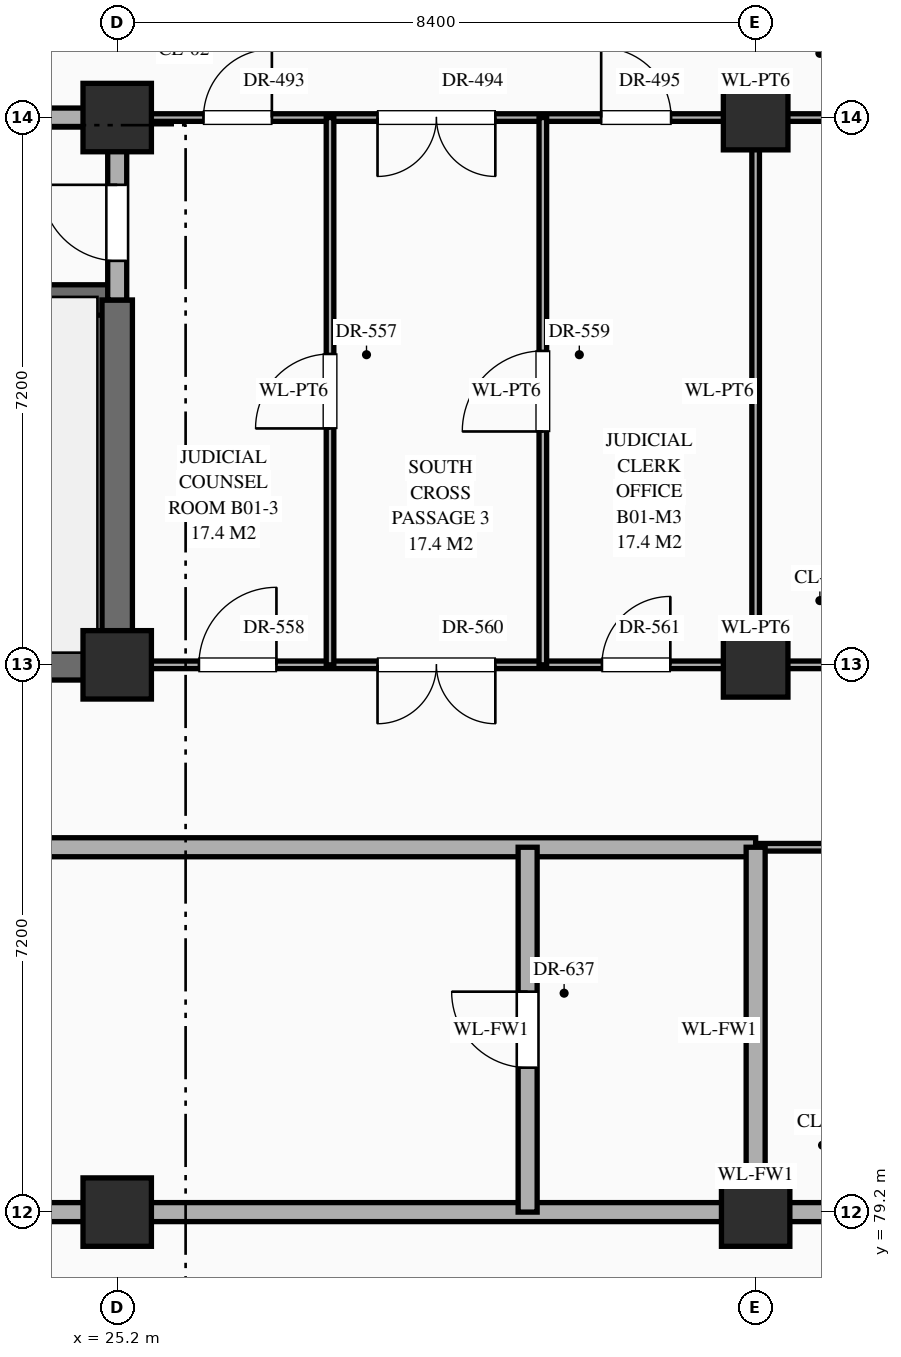
"""IFC4 building model, lengths in metres.
Left out: names, types, materials, properties, quantities, classifications, styles, units other than length and angle.
Written with IfcOpenShell. Run it as: python <this file> out.ifc"""

import sys

from ifc_helpers import new_model, si_unit, direction, frame, frame_2d, origin, origin_2d, place, context, subcontext, project, spatial, rectangle, extrude, element, fill, save


model = new_model("IFC4")
c1 = context("Model", 3, precision=1e-05, world=origin(), true_north=direction((0.0, 1.0)))
c2 = subcontext(c1, "Body", "Model", "MODEL_VIEW")
j1 = project(units=[si_unit("LENGTHUNIT", "METRE"), si_unit("PLANEANGLEUNIT", "RADIAN")], contexts=[c1])
p1 = place(None, origin())
s1 = spatial("IfcSite", under=j1, at=p1, CompositionType="ELEMENT")
p2 = place(p1, origin())
s2 = spatial("IfcBuilding", under=s1, at=p2, CompositionType="ELEMENT")
p3 = place(p2, frame((0.0, 0.0, -5.4)))
s3 = spatial("IfcBuildingStorey", under=s2, at=p3, CompositionType="ELEMENT", Elevation=-5.4)
for number, where, z_axis, x_axis in (
    (1, (25.2, 79.2, 0.0), (0.0, 0.0, 1.0), (1.0, 0.0, 0.0)),
    (2, (25.2, 86.4, 0.0), (0.0, 0.0, 1.0), (1.0, 0.0, 0.0)),
    (3, (25.2, 93.6, 0.0), (0.0, 0.0, 1.0), (1.0, 0.0, 0.0)),
    (4, (33.6, 79.2, 0.0), (0.0, 0.0, 1.0), (1.0, 0.0, 0.0)),
):
    element("IfcColumn", number, at=place(p3, frame(where, z_axis=z_axis, x_axis=x_axis)), inside=s3, PredefinedType="COLUMN", context=c2, shape_type="SweptSolid", body=[
        extrude(rectangle(XDim=0.9, YDim=0.9, at=origin_2d()), origin(), (0.0, 0.0, 1.0), 5.4),
    ])
for number, where, z_axis, x_axis in (
    (5, (33.6, 86.4, 0.0), (0.0, 0.0, 1.0), (1.0, 0.0, 0.0)),
    (6, (33.6, 93.6, 0.0), (0.0, 0.0, 1.0), (1.0, 0.0, 0.0)),
):
    element("IfcColumn", number, at=place(p3, frame(where, z_axis=z_axis, x_axis=x_axis)), inside=s3, PredefinedType="COLUMN", context=c2, shape_type="SweptSolid", body=[
        extrude(rectangle(XDim=0.85, YDim=0.85, at=origin_2d()), origin(), (0.0, 0.0, 1.0), 5.4),
    ])
p4 = place(p3, frame((16.8, 79.2, 0.0), z_axis=(0.0, 0.0, 1.0), x_axis=(1.0, 0.0, 0.0)))
e7 = element("IfcWall", 7, at=p4, inside=s3, PredefinedType="STANDARD", context=c2, shape_type="SweptSolid", body=[
    extrude(rectangle(XDim=33.6, YDim=0.25, at=frame_2d((16.8, 0.0))), origin(), (0.0, 0.0, 1.0), 4.13),
])
p5 = place(p3, frame((16.8, 84.0, 0.0), z_axis=(0.0, 0.0, 1.0), x_axis=(1.0, 0.0, 0.0)))
e8 = element("IfcWall", 8, at=p5, inside=s3, PredefinedType="STANDARD", context=c2, shape_type="SweptSolid", body=[
    extrude(rectangle(XDim=16.8, YDim=0.25, at=frame_2d((8.4, 0.0))), origin(), (0.0, 0.0, 1.0), 5.1),
])
p6 = place(p5, frame((6.425, 0.0, 0.0)))
e9 = element("IfcOpeningElement", 9, at=p6, cuts=e8, PredefinedType="OPENING", context=c2, shape_type="SweptSolid", body=[
    extrude(rectangle(XDim=0.95, YDim=2.15, at=frame_2d((0.475, 1.075))), frame((0.0, 0.137, 0.0), z_axis=(0.0, -1.0, 0.0), x_axis=(1.0, 0.0, 0.0)), (0.0, 0.0, 1.0), 0.274),
])
p7 = place(p3, frame((33.6, 84.0, 0.0), z_axis=(0.0, 0.0, 1.0), x_axis=(1.0, 0.0, 0.0)))
e10 = element("IfcWall", 10, at=p7, inside=s3, PredefinedType="STANDARD", context=c2, shape_type="SweptSolid", body=[
    extrude(rectangle(XDim=117.6, YDim=0.1, at=frame_2d((58.8, 0.0))), origin(), (0.0, 0.0, 1.0), 5.1),
])
p8 = place(p7, frame((3.66, 0.0, 0.0)))
e11 = element("IfcOpeningElement", 11, at=p8, cuts=e10, PredefinedType="OPENING", context=c2, shape_type="SweptSolid", body=[
    extrude(rectangle(XDim=1.08, YDim=2.25, at=frame_2d((0.54, 1.125))), frame((0.0, 0.062, 0.0), z_axis=(0.0, -1.0, 0.0), x_axis=(1.0, 0.0, 0.0)), (0.0, 0.0, 1.0), 0.124),
])
p9 = place(p7, frame((12.04, 0.0, 0.0)))
e12 = element("IfcOpeningElement", 12, at=p9, cuts=e10, PredefinedType="OPENING", context=c2, shape_type="SweptSolid", body=[
    extrude(rectangle(XDim=1.12, YDim=2.25, at=frame_2d((0.56, 1.125))), frame((0.0, 0.062, 0.0), z_axis=(0.0, -1.0, 0.0), x_axis=(1.0, 0.0, 0.0)), (0.0, 0.0, 1.0), 0.124),
])
p10 = place(p7, frame((20.4, 0.0, 0.0)))
e13 = element("IfcOpeningElement", 13, at=p10, cuts=e10, PredefinedType="OPENING", context=c2, shape_type="SweptSolid", body=[
    extrude(rectangle(XDim=1.2, YDim=2.35, at=frame_2d((0.6, 1.175))), frame((0.0, 0.062, 0.0), z_axis=(0.0, -1.0, 0.0), x_axis=(1.0, 0.0, 0.0)), (0.0, 0.0, 1.0), 0.124),
])
p11 = place(p7, frame((28.78, 0.0, 0.0)))
e14 = element("IfcOpeningElement", 14, at=p11, cuts=e10, PredefinedType="OPENING", context=c2, shape_type="SweptSolid", body=[
    extrude(rectangle(XDim=1.24, YDim=2.3, at=frame_2d((0.62, 1.15))), frame((0.0, 0.062, 0.0), z_axis=(0.0, -1.0, 0.0), x_axis=(1.0, 0.0, 0.0)), (0.0, 0.0, 1.0), 0.124),
])
p12 = place(p7, frame((37.16, 0.0, 0.0)))
e15 = element("IfcOpeningElement", 15, at=p12, cuts=e10, PredefinedType="OPENING", context=c2, shape_type="SweptSolid", body=[
    extrude(rectangle(XDim=1.28, YDim=2.35, at=frame_2d((0.64, 1.175))), frame((0.0, 0.062, 0.0), z_axis=(0.0, -1.0, 0.0), x_axis=(1.0, 0.0, 0.0)), (0.0, 0.0, 1.0), 0.124),
])
p13 = place(p7, frame((42.93, 0.0, 0.0)))
e16 = element("IfcOpeningElement", 16, at=p13, cuts=e10, PredefinedType="OPENING", context=c2, shape_type="SweptSolid", body=[
    extrude(rectangle(XDim=0.94, YDim=2.3, at=frame_2d((0.47, 1.15))), frame((0.0, 0.062, 0.0), z_axis=(0.0, -1.0, 0.0), x_axis=(1.0, 0.0, 0.0)), (0.0, 0.0, 1.0), 0.124),
])
p14 = place(p7, frame((45.71, 0.0, 0.0)))
e17 = element("IfcOpeningElement", 17, at=p14, cuts=e10, PredefinedType="OPENING", context=c2, shape_type="SweptSolid", body=[
    extrude(rectangle(XDim=0.98, YDim=2.35, at=frame_2d((0.49, 1.175))), frame((0.0, 0.062, 0.0), z_axis=(0.0, -1.0, 0.0), x_axis=(1.0, 0.0, 0.0)), (0.0, 0.0, 1.0), 0.124),
])
p15 = place(p7, frame((48.49, 0.0, 0.0)))
e18 = element("IfcOpeningElement", 18, at=p15, cuts=e10, PredefinedType="OPENING", context=c2, shape_type="SweptSolid", body=[
    extrude(rectangle(XDim=1.02, YDim=2.4, at=frame_2d((0.51, 1.2))), frame((0.0, 0.062, 0.0), z_axis=(0.0, -1.0, 0.0), x_axis=(1.0, 0.0, 0.0)), (0.0, 0.0, 1.0), 0.124),
])
p16 = place(p7, frame((54.03, 0.0, 0.0)))
e19 = element("IfcOpeningElement", 19, at=p16, cuts=e10, PredefinedType="OPENING", context=c2, shape_type="SweptSolid", body=[
    extrude(rectangle(XDim=1.14, YDim=2.4, at=frame_2d((0.57, 1.2))), frame((0.0, 0.062, 0.0), z_axis=(0.0, -1.0, 0.0), x_axis=(1.0, 0.0, 0.0)), (0.0, 0.0, 1.0), 0.124),
])
p17 = place(p7, frame((62.55, 0.0, 0.0)))
e20 = element("IfcOpeningElement", 20, at=p17, cuts=e10, PredefinedType="OPENING", context=c2, shape_type="SweptSolid", body=[
    extrude(rectangle(XDim=0.9, YDim=2.15, at=frame_2d((0.45, 1.075))), frame((0.0, 0.062, 0.0), z_axis=(0.0, -1.0, 0.0), x_axis=(1.0, 0.0, 0.0)), (0.0, 0.0, 1.0), 0.124),
])
p18 = place(p7, frame((70.97, 0.0, 0.0)))
e21 = element("IfcOpeningElement", 21, at=p18, cuts=e10, PredefinedType="OPENING", context=c2, shape_type="SweptSolid", body=[
    extrude(rectangle(XDim=0.86, YDim=2.1, at=frame_2d((0.43, 1.05))), frame((0.0, 0.062, 0.0), z_axis=(0.0, -1.0, 0.0), x_axis=(1.0, 0.0, 0.0)), (0.0, 0.0, 1.0), 0.124),
])
p19 = place(p7, frame((79.34, 0.0, 0.0)))
e22 = element("IfcOpeningElement", 22, at=p19, cuts=e10, PredefinedType="OPENING", context=c2, shape_type="SweptSolid", body=[
    extrude(rectangle(XDim=0.92, YDim=2.15, at=frame_2d((0.46, 1.075))), frame((0.0, 0.062, 0.0), z_axis=(0.0, -1.0, 0.0), x_axis=(1.0, 0.0, 0.0)), (0.0, 0.0, 1.0), 0.124),
])
p20 = place(p7, frame((87.72, 0.0, 0.0)))
e23 = element("IfcOpeningElement", 23, at=p20, cuts=e10, PredefinedType="OPENING", context=c2, shape_type="SweptSolid", body=[
    extrude(rectangle(XDim=0.96, YDim=2.2, at=frame_2d((0.48, 1.1))), frame((0.0, 0.062, 0.0), z_axis=(0.0, -1.0, 0.0), x_axis=(1.0, 0.0, 0.0)), (0.0, 0.0, 1.0), 0.124),
])
p21 = place(p7, frame((96.1, 0.0, 0.0)))
e24 = element("IfcOpeningElement", 24, at=p21, cuts=e10, PredefinedType="OPENING", context=c2, shape_type="SweptSolid", body=[
    extrude(rectangle(XDim=1.0, YDim=2.25, at=frame_2d((0.5, 1.125))), frame((0.0, 0.062, 0.0), z_axis=(0.0, -1.0, 0.0), x_axis=(1.0, 0.0, 0.0)), (0.0, 0.0, 1.0), 0.124),
])
p22 = place(p7, frame((104.48, 0.0, 0.0)))
e25 = element("IfcOpeningElement", 25, at=p22, cuts=e10, PredefinedType="OPENING", context=c2, shape_type="SweptSolid", body=[
    extrude(rectangle(XDim=1.04, YDim=2.2, at=frame_2d((0.52, 1.1))), frame((0.0, 0.062, 0.0), z_axis=(0.0, -1.0, 0.0), x_axis=(1.0, 0.0, 0.0)), (0.0, 0.0, 1.0), 0.124),
])
p23 = place(p7, frame((112.86, 0.0, 0.0)))
e26 = element("IfcOpeningElement", 26, at=p23, cuts=e10, PredefinedType="OPENING", context=c2, shape_type="SweptSolid", body=[
    extrude(rectangle(XDim=1.08, YDim=2.25, at=frame_2d((0.54, 1.125))), frame((0.0, 0.062, 0.0), z_axis=(0.0, -1.0, 0.0), x_axis=(1.0, 0.0, 0.0)), (0.0, 0.0, 1.0), 0.124),
])
p24 = place(p3, frame((16.8, 86.4, 0.0), z_axis=(0.0, 0.0, 1.0), x_axis=(1.0, 0.0, 0.0)))
e27 = element("IfcWall", 27, at=p24, inside=s3, PredefinedType="SHEAR", context=c2, shape_type="SweptSolid", body=[
    extrude(rectangle(XDim=8.4, YDim=0.4, at=frame_2d((4.2, 0.0))), origin(), (0.0, 0.0, 1.0), 5.1),
])
p25 = place(p3, frame((25.2, 86.4, 0.0), z_axis=(0.0, 0.0, 1.0), x_axis=(1.0, 0.0, 0.0)))
e28 = element("IfcWall", 28, at=p25, inside=s3, PredefinedType="STANDARD", context=c2, shape_type="SweptSolid", body=[
    extrude(rectangle(XDim=16.8, YDim=0.1, at=frame_2d((8.4, 0.0))), origin(), (0.0, 0.0, 1.0), 4.25),
])
p26 = place(p25, frame((1.075, 0.0, 0.0)))
e29 = element("IfcOpeningElement", 29, at=p26, cuts=e28, PredefinedType="OPENING", context=c2, shape_type="SweptSolid", body=[
    extrude(rectangle(XDim=1.02, YDim=2.4, at=frame_2d((0.51, 1.2))), frame((0.0, 0.062, 0.0), z_axis=(0.0, -1.0, 0.0), x_axis=(1.0, 0.0, 0.0)), (0.0, 0.0, 1.0), 0.124),
])
p27 = place(p25, frame((3.425, 0.0, 0.0)))
e30 = element("IfcOpeningElement", 30, at=p27, cuts=e28, PredefinedType="OPENING", context=c2, shape_type="SweptSolid", body=[
    extrude(rectangle(XDim=1.55, YDim=2.35, at=frame_2d((0.775, 1.175))), frame((0.0, 0.062, 0.0), z_axis=(0.0, -1.0, 0.0), x_axis=(1.0, 0.0, 0.0)), (0.0, 0.0, 1.0), 0.124),
])
p28 = place(p25, frame((6.377, 0.0, 0.0)))
e31 = element("IfcOpeningElement", 31, at=p28, cuts=e28, PredefinedType="OPENING", context=c2, shape_type="SweptSolid", body=[
    extrude(rectangle(XDim=0.9, YDim=2.15, at=frame_2d((0.45, 1.075))), frame((0.0, 0.062, 0.0), z_axis=(0.0, -1.0, 0.0), x_axis=(1.0, 0.0, 0.0)), (0.0, 0.0, 1.0), 0.124),
])
p29 = place(p25, frame((12.157, 0.0, 0.0)))
e32 = element("IfcOpeningElement", 32, at=p29, cuts=e28, PredefinedType="OPENING", context=c2, shape_type="SweptSolid", body=[
    extrude(rectangle(XDim=0.86, YDim=2.1, at=frame_2d((0.43, 1.05))), frame((0.0, 0.062, 0.0), z_axis=(0.0, -1.0, 0.0), x_axis=(1.0, 0.0, 0.0)), (0.0, 0.0, 1.0), 0.124),
])
p30 = place(p3, frame((16.8, 91.2, 0.0), z_axis=(0.0, 0.0, 1.0), x_axis=(1.0, 0.0, 0.0)))
e33 = element("IfcWall", 33, at=p30, inside=s3, PredefinedType="SHEAR", context=c2, shape_type="SweptSolid", body=[
    extrude(rectangle(XDim=8.4, YDim=0.4, at=frame_2d((4.2, 0.0))), origin(), (0.0, 0.0, 1.0), 5.1),
])
p31 = place(p30, frame((0.65, 0.0, 0.0)))
e34 = element("IfcOpeningElement", 34, at=p31, cuts=e33, PredefinedType="OPENING", context=c2, shape_type="SweptSolid", body=[
    extrude(rectangle(XDim=1.1, YDim=2.2, at=frame_2d((0.55, 1.1))), frame((0.0, 0.212, 0.0), z_axis=(0.0, -1.0, 0.0), x_axis=(1.0, 0.0, 0.0)), (0.0, 0.0, 1.0), 0.424),
])
p32 = place(p3, frame((16.8, 93.6, 0.0), z_axis=(0.0, 0.0, 1.0), x_axis=(1.0, 0.0, 0.0)))
e35 = element("IfcWall", 35, at=p32, inside=s3, PredefinedType="STANDARD", context=c2, shape_type="SweptSolid", body=[
    extrude(rectangle(XDim=8.4, YDim=0.25, at=frame_2d((4.2, 0.0))), origin(), (0.0, 0.0, 1.0), 4.25),
])
p33 = place(p32, frame((3.288, 0.0, 0.0)))
e36 = element("IfcOpeningElement", 36, at=p33, cuts=e35, PredefinedType="OPENING", context=c2, shape_type="SweptSolid", body=[
    extrude(rectangle(XDim=1.8, YDim=2.35, at=frame_2d((0.9, 1.175))), frame((0.0, 0.137, 0.0), z_axis=(0.0, -1.0, 0.0), x_axis=(1.0, 0.0, 0.0)), (0.0, 0.0, 1.0), 0.274),
])
p34 = place(p3, frame((25.2, 93.6, 0.0), z_axis=(0.0, 0.0, 1.0), x_axis=(1.0, 0.0, 0.0)))
e37 = element("IfcWall", 37, at=p34, inside=s3, PredefinedType="STANDARD", context=c2, shape_type="SweptSolid", body=[
    extrude(rectangle(XDim=16.8, YDim=0.1, at=frame_2d((8.4, 0.0))), origin(), (0.0, 0.0, 1.0), 4.25),
])
p35 = place(p34, frame((1.135, 0.0, 0.0)))
e38 = element("IfcOpeningElement", 38, at=p35, cuts=e37, PredefinedType="OPENING", context=c2, shape_type="SweptSolid", body=[
    extrude(rectangle(XDim=0.9, YDim=2.15, at=frame_2d((0.45, 1.075))), frame((0.0, 0.062, 0.0), z_axis=(0.0, -1.0, 0.0), x_axis=(1.0, 0.0, 0.0)), (0.0, 0.0, 1.0), 0.124),
])
p36 = place(p34, frame((3.425, 0.0, 0.0)))
e39 = element("IfcOpeningElement", 39, at=p36, cuts=e37, PredefinedType="OPENING", context=c2, shape_type="SweptSolid", body=[
    extrude(rectangle(XDim=1.55, YDim=2.35, at=frame_2d((0.775, 1.175))), frame((0.0, 0.062, 0.0), z_axis=(0.0, -1.0, 0.0), x_axis=(1.0, 0.0, 0.0)), (0.0, 0.0, 1.0), 0.124),
])
p37 = place(p34, frame((6.367, 0.0, 0.0)))
e40 = element("IfcOpeningElement", 40, at=p37, cuts=e37, PredefinedType="OPENING", context=c2, shape_type="SweptSolid", body=[
    extrude(rectangle(XDim=0.92, YDim=2.15, at=frame_2d((0.46, 1.075))), frame((0.0, 0.062, 0.0), z_axis=(0.0, -1.0, 0.0), x_axis=(1.0, 0.0, 0.0)), (0.0, 0.0, 1.0), 0.124),
])
p38 = place(p34, frame((12.107, 0.0, 0.0)))
e41 = element("IfcOpeningElement", 41, at=p38, cuts=e37, PredefinedType="OPENING", context=c2, shape_type="SweptSolid", body=[
    extrude(rectangle(XDim=0.96, YDim=2.2, at=frame_2d((0.48, 1.1))), frame((0.0, 0.062, 0.0), z_axis=(0.0, -1.0, 0.0), x_axis=(1.0, 0.0, 0.0)), (0.0, 0.0, 1.0), 0.124),
])
p39 = place(p3, frame((25.2, 86.4, 0.0), z_axis=(0.0, 0.0, 1.0), x_axis=(0.0, 1.0, 0.0)))
e42 = element("IfcWall", 42, at=p39, inside=s3, PredefinedType="SHEAR", context=c2, shape_type="SweptSolid", body=[
    extrude(rectangle(XDim=4.8, YDim=0.4, at=frame_2d((2.4, 0.0))), origin(), (0.0, 0.0, 1.0), 5.1),
])
p40 = place(p3, frame((25.2, 91.2, 0.0), z_axis=(0.0, 0.0, 1.0), x_axis=(0.0, 1.0, 0.0)))
e43 = element("IfcWall", 43, at=p40, inside=s3, PredefinedType="STANDARD", context=c2, shape_type="SweptSolid", body=[
    extrude(rectangle(XDim=2.4, YDim=0.25, at=frame_2d((1.2, 0.0))), origin(), (0.0, 0.0, 1.0), 4.35),
])
p41 = place(p40, frame((0.515, 0.0, 0.0)))
e44 = element("IfcOpeningElement", 44, at=p41, cuts=e43, PredefinedType="OPENING", context=c2, shape_type="SweptSolid", body=[
    extrude(rectangle(XDim=1.0, YDim=2.2, at=frame_2d((0.5, 1.1))), frame((0.0, 0.137, 0.0), z_axis=(0.0, -1.0, 0.0), x_axis=(1.0, 0.0, 0.0)), (0.0, 0.0, 1.0), 0.274),
])
p42 = place(p3, frame((28.0, 86.4, 0.0), z_axis=(0.0, 0.0, 1.0), x_axis=(0.0, 1.0, 0.0)))
e45 = element("IfcWall", 45, at=p42, inside=s3, PredefinedType="STANDARD", context=c2, shape_type="SweptSolid", body=[
    extrude(rectangle(XDim=7.2, YDim=0.1, at=frame_2d((3.6, 0.0))), origin(), (0.0, 0.0, 1.0), 5.1),
])
p43 = place(p42, frame((3.11, 0.0, 0.0)))
e46 = element("IfcOpeningElement", 46, at=p43, cuts=e45, PredefinedType="OPENING", context=c2, shape_type="SweptSolid", body=[
    extrude(rectangle(XDim=0.98, YDim=2.35, at=frame_2d((0.49, 1.175))), frame((0.0, 0.062, 0.0), z_axis=(0.0, -1.0, 0.0), x_axis=(1.0, 0.0, 0.0)), (0.0, 0.0, 1.0), 0.124),
])
p44 = place(p3, frame((30.6, 79.2, 0.0), z_axis=(0.0, 0.0, 1.0), x_axis=(0.0, 1.0, 0.0)))
e47 = element("IfcWall", 47, at=p44, inside=s3, PredefinedType="STANDARD", context=c2, shape_type="SweptSolid", body=[
    extrude(rectangle(XDim=4.8, YDim=0.25, at=frame_2d((2.4, 0.0))), origin(), (0.0, 0.0, 1.0), 5.1),
])
p45 = place(p44, frame((1.9, 0.0, 0.0)))
e48 = element("IfcOpeningElement", 48, at=p45, cuts=e47, PredefinedType="OPENING", context=c2, shape_type="SweptSolid", body=[
    extrude(rectangle(XDim=1.0, YDim=2.2, at=frame_2d((0.5, 1.1))), frame((0.0, 0.137, 0.0), z_axis=(0.0, -1.0, 0.0), x_axis=(1.0, 0.0, 0.0)), (0.0, 0.0, 1.0), 0.274),
])
p46 = place(p3, frame((30.8, 86.4, 0.0), z_axis=(0.0, 0.0, 1.0), x_axis=(0.0, 1.0, 0.0)))
e49 = element("IfcWall", 49, at=p46, inside=s3, PredefinedType="STANDARD", context=c2, shape_type="SweptSolid", body=[
    extrude(rectangle(XDim=7.2, YDim=0.1, at=frame_2d((3.6, 0.0))), origin(), (0.0, 0.0, 1.0), 5.1),
])
p47 = place(p46, frame((3.07, 0.0, 0.0)))
e50 = element("IfcOpeningElement", 50, at=p47, cuts=e49, PredefinedType="OPENING", context=c2, shape_type="SweptSolid", body=[
    extrude(rectangle(XDim=1.06, YDim=2.4, at=frame_2d((0.53, 1.2))), frame((0.0, 0.062, 0.0), z_axis=(0.0, -1.0, 0.0), x_axis=(1.0, 0.0, 0.0)), (0.0, 0.0, 1.0), 0.124),
])
p48 = place(p3, frame((33.6, 79.2, 0.0), z_axis=(0.0, 0.0, 1.0), x_axis=(0.0, 1.0, 0.0)))
e51 = element("IfcWall", 51, at=p48, inside=s3, PredefinedType="STANDARD", context=c2, shape_type="SweptSolid", body=[
    extrude(rectangle(XDim=4.8, YDim=0.25, at=frame_2d((2.4, 0.0))), origin(), (0.0, 0.0, 1.0), 4.35),
])
p49 = place(p3, frame((33.6, 86.4, 0.0), z_axis=(0.0, 0.0, 1.0), x_axis=(0.0, 1.0, 0.0)))
e52 = element("IfcWall", 52, at=p49, inside=s3, PredefinedType="STANDARD", context=c2, shape_type="SweptSolid", body=[
    extrude(rectangle(XDim=7.2, YDim=0.1, at=frame_2d((3.6, 0.0))), origin(), (0.0, 0.0, 1.0), 4.35),
])
p50 = place(p41, origin())
e53 = element("IfcDoor", 53, at=p50, inside=s3, OperationType="SINGLE_SWING_RIGHT", PredefinedType="DOOR", context=c2, shape_type="SweptSolid", body=[
    extrude(rectangle(XDim=1.0, YDim=2.2, at=frame_2d((0.5, 1.1))), frame((0.0, 0.025, 0.0), z_axis=(0.0, -1.0, 0.0), x_axis=(1.0, 0.0, 0.0)), (0.0, 0.0, 1.0), 0.05),
])
fill(e44, e53)
p51 = place(p35, origin())
e54 = element("IfcDoor", 54, at=p51, inside=s3, OperationType="SINGLE_SWING_RIGHT", PredefinedType="DOOR", context=c2, shape_type="SweptSolid", body=[
    extrude(rectangle(XDim=0.9, YDim=2.15, at=frame_2d((0.45, 1.075))), frame((0.0, 0.025, 0.0), z_axis=(0.0, -1.0, 0.0), x_axis=(1.0, 0.0, 0.0)), (0.0, 0.0, 1.0), 0.05),
])
fill(e38, e54)
p52 = place(p36, frame((1.55, 0.0, 0.0), z_axis=(0.0, 0.0, 1.0), x_axis=(-1.0, 0.0, 0.0)))
e55 = element("IfcDoor", 55, at=p52, inside=s3, OperationType="DOUBLE_DOOR_SINGLE_SWING", PredefinedType="DOOR", context=c2, shape_type="SweptSolid", body=[
    extrude(rectangle(XDim=1.55, YDim=2.35, at=frame_2d((0.775, 1.175))), frame((0.0, 0.025, 0.0), z_axis=(0.0, -1.0, 0.0), x_axis=(1.0, 0.0, 0.0)), (0.0, 0.0, 1.0), 0.05),
])
fill(e39, e55)
p53 = place(p37, origin())
e56 = element("IfcDoor", 56, at=p53, inside=s3, OperationType="SINGLE_SWING_LEFT", PredefinedType="DOOR", context=c2, shape_type="SweptSolid", body=[
    extrude(rectangle(XDim=0.92, YDim=2.15, at=frame_2d((0.46, 1.075))), frame((0.0, 0.025, 0.0), z_axis=(0.0, -1.0, 0.0), x_axis=(1.0, 0.0, 0.0)), (0.0, 0.0, 1.0), 0.05),
])
fill(e40, e56)
p54 = place(p43, origin())
e57 = element("IfcDoor", 57, at=p54, inside=s3, OperationType="SINGLE_SWING_LEFT", PredefinedType="DOOR", context=c2, shape_type="SweptSolid", body=[
    extrude(rectangle(XDim=0.98, YDim=2.35, at=frame_2d((0.49, 1.175))), frame((0.0, 0.025, 0.0), z_axis=(0.0, -1.0, 0.0), x_axis=(1.0, 0.0, 0.0)), (0.0, 0.0, 1.0), 0.05),
])
fill(e46, e57)
p55 = place(p26, origin())
e58 = element("IfcDoor", 58, at=p55, inside=s3, OperationType="SINGLE_SWING_RIGHT", PredefinedType="DOOR", context=c2, shape_type="SweptSolid", body=[
    extrude(rectangle(XDim=1.02, YDim=2.4, at=frame_2d((0.51, 1.2))), frame((0.0, 0.025, 0.0), z_axis=(0.0, -1.0, 0.0), x_axis=(1.0, 0.0, 0.0)), (0.0, 0.0, 1.0), 0.05),
])
fill(e29, e58)
p56 = place(p47, origin())
e59 = element("IfcDoor", 59, at=p56, inside=s3, OperationType="SINGLE_SWING_LEFT", PredefinedType="DOOR", context=c2, shape_type="SweptSolid", body=[
    extrude(rectangle(XDim=1.06, YDim=2.4, at=frame_2d((0.53, 1.2))), frame((0.0, 0.025, 0.0), z_axis=(0.0, -1.0, 0.0), x_axis=(1.0, 0.0, 0.0)), (0.0, 0.0, 1.0), 0.05),
])
fill(e50, e59)
p57 = place(p27, frame((1.55, 0.0, 0.0), z_axis=(0.0, 0.0, 1.0), x_axis=(-1.0, 0.0, 0.0)))
e60 = element("IfcDoor", 60, at=p57, inside=s3, OperationType="DOUBLE_DOOR_SINGLE_SWING", PredefinedType="DOOR", context=c2, shape_type="SweptSolid", body=[
    extrude(rectangle(XDim=1.55, YDim=2.35, at=frame_2d((0.775, 1.175))), frame((0.0, 0.025, 0.0), z_axis=(0.0, -1.0, 0.0), x_axis=(1.0, 0.0, 0.0)), (0.0, 0.0, 1.0), 0.05),
])
fill(e30, e60)
p58 = place(p28, origin())
e61 = element("IfcDoor", 61, at=p58, inside=s3, OperationType="SINGLE_SWING_RIGHT", PredefinedType="DOOR", context=c2, shape_type="SweptSolid", body=[
    extrude(rectangle(XDim=0.9, YDim=2.15, at=frame_2d((0.45, 1.075))), frame((0.0, 0.025, 0.0), z_axis=(0.0, -1.0, 0.0), x_axis=(1.0, 0.0, 0.0)), (0.0, 0.0, 1.0), 0.05),
])
fill(e31, e61)
p59 = place(p45, origin())
e62 = element("IfcDoor", 62, at=p59, inside=s3, OperationType="SINGLE_SWING_RIGHT", PredefinedType="DOOR", context=c2, shape_type="SweptSolid", body=[
    extrude(rectangle(XDim=1.0, YDim=2.2, at=frame_2d((0.5, 1.1))), frame((0.0, 0.025, 0.0), z_axis=(0.0, -1.0, 0.0), x_axis=(1.0, 0.0, 0.0)), (0.0, 0.0, 1.0), 0.05),
])
fill(e48, e62)
save(model, sys.argv[1])
